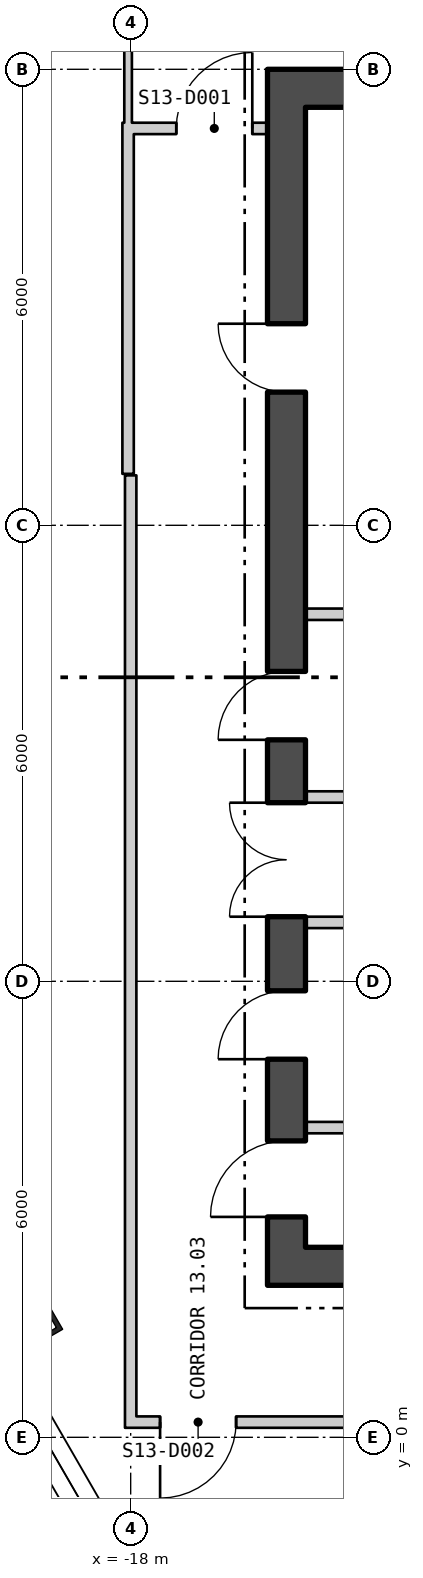
"""IFC4 building model, lengths in metres.
Left out: names, types, materials, properties, quantities, classifications, styles, units other than length and angle.
Written with IfcOpenShell. Run it as: python <this file> out.ifc"""

import sys

from ifc_helpers import new_model, si_unit, direction, frame, frame_2d, origin, origin_2d, place, context, subcontext, project, spatial, polyline, rectangle, hollow_rectangle, outline, extrude, element, fill, save


model = new_model("IFC4")
c1 = context("Model", 3, precision=1e-05, world=origin(), true_north=direction((0.0, 1.0)))
c2 = subcontext(c1, "Body", "Model", "MODEL_VIEW")
j1 = project(units=[si_unit("LENGTHUNIT", "METRE"), si_unit("PLANEANGLEUNIT", "RADIAN")], contexts=[c1])
p1 = place(None, origin())
s1 = spatial("IfcSite", under=j1, at=p1, CompositionType="ELEMENT")
p2 = place(p1, origin())
s2 = spatial("IfcBuilding", under=s1, at=p2, CompositionType="ELEMENT")
p3 = place(p2, frame((0.0, 0.0, 174.9)))
s3 = spatial("IfcBuildingStorey", under=s2, at=p3, CompositionType="ELEMENT", Elevation=174.9)
p4 = place(p3, frame((-19.348, 1.506, 0.0), z_axis=(0.0, 0.0, 1.0), x_axis=(0.5, -0.866025403784, 0.0)))
e1 = element("IfcColumn", 1, at=p4, inside=s3, PredefinedType="COLUMN", context=c2, shape_type="SweptSolid", body=[
    extrude(hollow_rectangle(XDim=0.6, YDim=0.7, WallThickness=0.06, at=origin_2d()), origin(), (0.0, 0.0, 1.0), 3.9),
])
p5 = place(p3, frame((-26.775, 13.22, -0.18), z_axis=(0.0, 0.0, 1.0), x_axis=(0.500000335318, -0.866025210188, 0.0)))
e2 = element("IfcWall", 2, at=p5, inside=s3, PredefinedType="SOLIDWALL", context=c2, shape_type="SweptSolid", body=[
    extrude(outline(polyline([(-0.13, -0.225), (45.88, -0.225), (45.62, 0.225), (0.13, 0.225), (-0.13, -0.225)])), origin(), (0.0, 0.0, 1.0), 3.68),
])
p6 = place(p5, frame((1.425, 0.0, 1.08)))
e3 = element("IfcOpeningElement", 3, at=p6, cuts=e2, PredefinedType="OPENING", context=c2, shape_type="SweptSolid", body=[
    extrude(rectangle(XDim=2.4, YDim=2.0, at=frame_2d((1.2, 1.0))), frame((0.0, 0.235, 0.0), z_axis=(0.0, -1.0, 0.0), x_axis=(1.0, 0.0, 0.0)), (0.0, 0.0, 1.0), 0.47),
])
p7 = place(p5, frame((5.895, 0.0, 1.08)))
e4 = element("IfcOpeningElement", 4, at=p7, cuts=e2, PredefinedType="OPENING", context=c2, shape_type="SweptSolid", body=[
    extrude(rectangle(XDim=2.4, YDim=2.0, at=frame_2d((1.2, 1.0))), frame((0.0, 0.235, 0.0), z_axis=(0.0, -1.0, 0.0), x_axis=(1.0, 0.0, 0.0)), (0.0, 0.0, 1.0), 0.47),
])
p8 = place(p5, frame((10.403, 0.0, 1.08)))
e5 = element("IfcOpeningElement", 5, at=p8, cuts=e2, PredefinedType="OPENING", context=c2, shape_type="SweptSolid", body=[
    extrude(rectangle(XDim=2.4, YDim=2.0, at=frame_2d((1.2, 1.0))), frame((0.0, 0.235, 0.0), z_axis=(0.0, -1.0, 0.0), x_axis=(1.0, 0.0, 0.0)), (0.0, 0.0, 1.0), 0.47),
])
p9 = place(p5, frame((14.912, 0.0, 1.08)))
e6 = element("IfcOpeningElement", 6, at=p9, cuts=e2, PredefinedType="OPENING", context=c2, shape_type="SweptSolid", body=[
    extrude(rectangle(XDim=2.4, YDim=2.0, at=frame_2d((1.2, 1.0))), frame((0.0, 0.235, 0.0), z_axis=(0.0, -1.0, 0.0), x_axis=(1.0, 0.0, 0.0)), (0.0, 0.0, 1.0), 0.47),
])
p10 = place(p5, frame((19.421, 0.0, 1.08)))
e7 = element("IfcOpeningElement", 7, at=p10, cuts=e2, PredefinedType="OPENING", context=c2, shape_type="SweptSolid", body=[
    extrude(rectangle(XDim=2.4, YDim=2.0, at=frame_2d((1.2, 1.0))), frame((0.0, 0.235, 0.0), z_axis=(0.0, -1.0, 0.0), x_axis=(1.0, 0.0, 0.0)), (0.0, 0.0, 1.0), 0.47),
])
p11 = place(p5, frame((23.929, 0.0, 1.08)))
e8 = element("IfcOpeningElement", 8, at=p11, cuts=e2, PredefinedType="OPENING", context=c2, shape_type="SweptSolid", body=[
    extrude(rectangle(XDim=2.4, YDim=2.0, at=frame_2d((1.2, 1.0))), frame((0.0, 0.235, 0.0), z_axis=(0.0, -1.0, 0.0), x_axis=(1.0, 0.0, 0.0)), (0.0, 0.0, 1.0), 0.47),
])
p12 = place(p5, frame((28.438, 0.0, 1.08)))
e9 = element("IfcOpeningElement", 9, at=p12, cuts=e2, PredefinedType="OPENING", context=c2, shape_type="SweptSolid", body=[
    extrude(rectangle(XDim=2.4, YDim=2.0, at=frame_2d((1.2, 1.0))), frame((0.0, 0.235, 0.0), z_axis=(0.0, -1.0, 0.0), x_axis=(1.0, 0.0, 0.0)), (0.0, 0.0, 1.0), 0.47),
])
p13 = place(p5, frame((32.947, 0.0, 1.08)))
e10 = element("IfcOpeningElement", 10, at=p13, cuts=e2, PredefinedType="OPENING", context=c2, shape_type="SweptSolid", body=[
    extrude(rectangle(XDim=2.4, YDim=2.0, at=frame_2d((1.2, 1.0))), frame((0.0, 0.235, 0.0), z_axis=(0.0, -1.0, 0.0), x_axis=(1.0, 0.0, 0.0)), (0.0, 0.0, 1.0), 0.47),
])
p14 = place(p5, frame((37.455, 0.0, 1.08)))
e11 = element("IfcOpeningElement", 11, at=p14, cuts=e2, PredefinedType="OPENING", context=c2, shape_type="SweptSolid", body=[
    extrude(rectangle(XDim=2.4, YDim=2.0, at=frame_2d((1.2, 1.0))), frame((0.0, 0.235, 0.0), z_axis=(0.0, -1.0, 0.0), x_axis=(1.0, 0.0, 0.0)), (0.0, 0.0, 1.0), 0.47),
])
p15 = place(p5, frame((41.925, 0.0, 1.08)))
e12 = element("IfcOpeningElement", 12, at=p15, cuts=e2, PredefinedType="OPENING", context=c2, shape_type="SweptSolid", body=[
    extrude(rectangle(XDim=2.4, YDim=2.0, at=frame_2d((1.2, 1.0))), frame((0.0, 0.235, 0.0), z_axis=(0.0, -1.0, 0.0), x_axis=(1.0, 0.0, 0.0)), (0.0, 0.0, 1.0), 0.47),
])
p16 = place(p3, frame((-16.2, 2.25, 0.0), z_axis=(0.0, 0.0, 1.0), x_axis=(1.0, 0.0, 0.0)))
e13 = element("IfcWall", 13, at=p16, inside=s3, PredefinedType="SHEAR", context=c2, shape_type="SweptSolid", body=[
    extrude(rectangle(XDim=32.4, YDim=0.5, at=frame_2d((16.2, 0.0))), origin(), (0.0, 0.0, 1.0), 3.7),
])
p17 = place(p16, frame((10.7, 0.0, 0.0)))
e14 = element("IfcOpeningElement", 14, at=p17, cuts=e13, PredefinedType="OPENING", context=c2, shape_type="SweptSolid", body=[
    extrude(rectangle(XDim=1.8, YDim=2.4, at=frame_2d((0.9, 1.2))), frame((0.0, 0.26, 0.0), z_axis=(0.0, -1.0, 0.0), x_axis=(1.0, 0.0, 0.0)), (0.0, 0.0, 1.0), 0.52),
])
p18 = place(p16, frame((20.7, 0.0, 0.0)))
e15 = element("IfcOpeningElement", 15, at=p18, cuts=e13, PredefinedType="OPENING", context=c2, shape_type="SweptSolid", body=[
    extrude(rectangle(XDim=1.8, YDim=2.4, at=frame_2d((0.9, 1.2))), frame((0.0, 0.26, 0.0), z_axis=(0.0, -1.0, 0.0), x_axis=(1.0, 0.0, 0.0)), (0.0, 0.0, 1.0), 0.52),
])
p19 = place(p3, frame((-16.2, 17.75, 0.0), z_axis=(0.0, 0.0, 1.0), x_axis=(1.0, 0.0, 0.0)))
e16 = element("IfcWall", 16, at=p19, inside=s3, PredefinedType="SHEAR", context=c2, shape_type="SweptSolid", body=[
    extrude(rectangle(XDim=32.4, YDim=0.5, at=frame_2d((16.2, 0.0))), origin(), (0.0, 0.0, 1.0), 3.7),
])
p20 = place(p3, frame((-15.95, 2.5, 0.0), z_axis=(0.0, 0.0, 1.0), x_axis=(0.0, 1.0, 0.0)))
e17 = element("IfcWall", 17, at=p20, inside=s3, PredefinedType="SHEAR", context=c2, shape_type="SweptSolid", body=[
    extrude(rectangle(XDim=15.0, YDim=0.5, at=frame_2d((7.5, 0.0))), origin(), (0.0, 0.0, 1.0), 3.7),
])
p21 = place(p20, frame((4.35, 0.0, 0.0)))
e18 = element("IfcOpeningElement", 18, at=p21, cuts=e17, PredefinedType="OPENING", context=c2, shape_type="SweptSolid", body=[
    extrude(rectangle(XDim=1.5, YDim=2.1, at=frame_2d((0.75, 1.05))), frame((0.0, 0.26, 0.0), z_axis=(0.0, -1.0, 0.0), x_axis=(1.0, 0.0, 0.0)), (0.0, 0.0, 1.0), 0.52),
])
p22 = place(p20, frame((0.4, 0.0, 0.0)))
e19 = element("IfcOpeningElement", 19, at=p22, cuts=e17, PredefinedType="OPENING", context=c2, shape_type="SweptSolid", body=[
    extrude(rectangle(XDim=1.0, YDim=2.1, at=frame_2d((0.5, 1.05))), frame((0.0, 0.26, 0.0), z_axis=(0.0, -1.0, 0.0), x_axis=(1.0, 0.0, 0.0)), (0.0, 0.0, 1.0), 0.52),
])
p23 = place(p20, frame((2.475, 0.0, 0.0)))
e20 = element("IfcOpeningElement", 20, at=p23, cuts=e17, PredefinedType="OPENING", context=c2, shape_type="SweptSolid", body=[
    extrude(rectangle(XDim=0.9, YDim=2.1, at=frame_2d((0.45, 1.05))), frame((0.0, 0.26, 0.0), z_axis=(0.0, -1.0, 0.0), x_axis=(1.0, 0.0, 0.0)), (0.0, 0.0, 1.0), 0.52),
])
p24 = place(p20, frame((6.677, 0.0, 0.0)))
e21 = element("IfcOpeningElement", 21, at=p24, cuts=e17, PredefinedType="OPENING", context=c2, shape_type="SweptSolid", body=[
    extrude(rectangle(XDim=0.9, YDim=2.1, at=frame_2d((0.45, 1.05))), frame((0.0, 0.26, 0.0), z_axis=(0.0, -1.0, 0.0), x_axis=(1.0, 0.0, 0.0)), (0.0, 0.0, 1.0), 0.52),
])
p25 = place(p20, frame((11.252, 0.0, 0.0)))
e22 = element("IfcOpeningElement", 22, at=p25, cuts=e17, PredefinedType="OPENING", context=c2, shape_type="SweptSolid", body=[
    extrude(rectangle(XDim=0.9, YDim=2.1, at=frame_2d((0.45, 1.05))), frame((0.0, 0.26, 0.0), z_axis=(0.0, -1.0, 0.0), x_axis=(1.0, 0.0, 0.0)), (0.0, 0.0, 1.0), 0.52),
])
for number, where, z_axis, x_axis in (
    (23, (-15.7, 6.775, 0.0), (0.0, 0.0, 1.0), (1.0, 0.0, 0.0)),
    (24, (-15.7, 8.425, 0.0), (0.0, 0.0, 1.0), (1.0, 0.0, 0.0)),
    (25, (-15.7, 4.075, 0.0), (0.0, 0.0, 1.0), (1.0, 0.0, 0.0)),
    (26, (-15.7, 10.829, 0.0), (0.0, 0.0, 1.0), (1.0, 0.0, 0.0)),
):
    element("IfcWall", number, at=place(p3, frame(where, z_axis=z_axis, x_axis=x_axis)), inside=s3, PredefinedType="PARTITIONING", context=c2, shape_type="SweptSolid", body=[
        extrude(rectangle(XDim=1.2, YDim=0.15, at=frame_2d((0.6, 0.0))), origin(), (0.0, 0.0, 1.0), 3.7),
    ])
p26 = place(p3, frame((-18.034, 12.677, 0.0), z_axis=(0.0, 0.0, 1.0), x_axis=(0.0, 1.0, 0.0)))
e27 = element("IfcWall", 27, at=p26, inside=s3, PredefinedType="PARTITIONING", context=c2, shape_type="SweptSolid", body=[
    extrude(rectangle(XDim=4.62, YDim=0.15, at=frame_2d((2.31, 0.0))), origin(), (0.0, 0.0, 1.0), 3.7),
])
p27 = place(p3, frame((-18.034, 17.297, 0.0), z_axis=(0.0, 0.0, 1.0), x_axis=(0.0, 1.0, 0.0)))
e28 = element("IfcWall", 28, at=p27, inside=s3, PredefinedType="PARTITIONING", context=c2, shape_type="SweptSolid", body=[
    extrude(rectangle(XDim=2.003, YDim=0.1, at=frame_2d((1.002, 0.0))), origin(), (0.0, 0.0, 1.0), 3.7),
])
p28 = place(p3, frame((-18.0, 0.125, 0.0), z_axis=(0.0, 0.0, 1.0), x_axis=(0.0, 1.0, 0.0)))
e29 = element("IfcWall", 29, at=p28, inside=s3, PredefinedType="PARTITIONING", context=c2, shape_type="SweptSolid", body=[
    extrude(rectangle(XDim=12.532, YDim=0.15, at=frame_2d((6.266, 0.0))), origin(), (0.0, 0.0, 1.0), 3.7),
])
p29 = place(p3, frame((-17.959, 17.222, 0.0), z_axis=(0.0, 0.0, 1.0), x_axis=(1.0, 0.0, 0.0)))
e30 = element("IfcWall", 30, at=p29, inside=s3, PredefinedType="PARTITIONING", context=c2, shape_type="SweptSolid", body=[
    extrude(rectangle(XDim=1.759, YDim=0.15, at=frame_2d((0.879, 0.0))), origin(), (0.0, 0.0, 1.0), 3.7),
])
p30 = place(p29, frame((0.559, 0.0, 0.0)))
e31 = element("IfcOpeningElement", 31, at=p30, cuts=e30, PredefinedType="OPENING", context=c2, shape_type="SweptSolid", body=[
    extrude(rectangle(XDim=1.0, YDim=2.1, at=frame_2d((0.5, 1.05))), frame((0.0, 0.085, 0.0), z_axis=(0.0, -1.0, 0.0), x_axis=(1.0, 0.0, 0.0)), (0.0, 0.0, 1.0), 0.17),
])
p31 = place(p3, frame((-17.925, 0.2, 0.0), z_axis=(0.0, 0.0, 1.0), x_axis=(1.0, 0.0, 0.0)))
e32 = element("IfcWall", 32, at=p31, inside=s3, PredefinedType="PARTITIONING", context=c2, shape_type="SweptSolid", body=[
    extrude(rectangle(XDim=10.83, YDim=0.15, at=frame_2d((5.415, 0.0))), origin(), (0.0, 0.0, 1.0), 3.7),
])
p32 = place(p31, frame((0.312, 0.0, 0.0)))
e33 = element("IfcOpeningElement", 33, at=p32, cuts=e32, PredefinedType="OPENING", context=c2, shape_type="SweptSolid", body=[
    extrude(rectangle(XDim=1.0, YDim=2.1, at=frame_2d((0.5, 1.05))), frame((0.0, 0.085, 0.0), z_axis=(0.0, -1.0, 0.0), x_axis=(1.0, 0.0, 0.0)), (0.0, 0.0, 1.0), 0.17),
])
p33 = place(p9, origin())
e34 = element("IfcWindow", 34, at=p33, inside=s3, PartitioningType="SINGLE_PANEL", PredefinedType="WINDOW", context=c2, shape_type="SweptSolid", body=[
    extrude(rectangle(XDim=2.4, YDim=2.0, at=frame_2d((1.2, 1.0))), frame((0.0, 0.105, 0.0), z_axis=(0.0, -1.0, 0.0), x_axis=(1.0, 0.0, 0.0)), (0.0, 0.0, 1.0), 0.06),
])
fill(e6, e34)
p34 = place(p21, origin())
e35 = element("IfcDoor", 35, at=p34, inside=s3, OperationType="DOUBLE_DOOR_SINGLE_SWING", PredefinedType="DOOR", context=c2, shape_type="SweptSolid", body=[
    extrude(rectangle(XDim=1.5, YDim=2.1, at=frame_2d((0.75, 1.05))), frame((0.0, 0.025, 0.0), z_axis=(0.0, -1.0, 0.0), x_axis=(1.0, 0.0, 0.0)), (0.0, 0.0, 1.0), 0.05),
])
fill(e18, e35)
p35 = place(p22, origin())
e36 = element("IfcDoor", 36, at=p35, inside=s3, OperationType="SINGLE_SWING_RIGHT", PredefinedType="DOOR", context=c2, shape_type="SweptSolid", body=[
    extrude(rectangle(XDim=1.0, YDim=2.1, at=frame_2d((0.5, 1.05))), frame((0.0, 0.025, 0.0), z_axis=(0.0, -1.0, 0.0), x_axis=(1.0, 0.0, 0.0)), (0.0, 0.0, 1.0), 0.05),
])
fill(e19, e36)
p36 = place(p23, origin())
e37 = element("IfcDoor", 37, at=p36, inside=s3, OperationType="SINGLE_SWING_RIGHT", PredefinedType="DOOR", context=c2, shape_type="SweptSolid", body=[
    extrude(rectangle(XDim=0.9, YDim=2.1, at=frame_2d((0.45, 1.05))), frame((0.0, 0.025, 0.0), z_axis=(0.0, -1.0, 0.0), x_axis=(1.0, 0.0, 0.0)), (0.0, 0.0, 1.0), 0.05),
])
fill(e20, e37)
p37 = place(p24, origin())
e38 = element("IfcDoor", 38, at=p37, inside=s3, OperationType="SINGLE_SWING_RIGHT", PredefinedType="DOOR", context=c2, shape_type="SweptSolid", body=[
    extrude(rectangle(XDim=0.9, YDim=2.1, at=frame_2d((0.45, 1.05))), frame((0.0, 0.025, 0.0), z_axis=(0.0, -1.0, 0.0), x_axis=(1.0, 0.0, 0.0)), (0.0, 0.0, 1.0), 0.05),
])
fill(e21, e38)
p38 = place(p25, origin())
e39 = element("IfcDoor", 39, at=p38, inside=s3, OperationType="SINGLE_SWING_LEFT", PredefinedType="DOOR", context=c2, shape_type="SweptSolid", body=[
    extrude(rectangle(XDim=0.9, YDim=2.1, at=frame_2d((0.45, 1.05))), frame((0.0, 0.025, 0.0), z_axis=(0.0, -1.0, 0.0), x_axis=(1.0, 0.0, 0.0)), (0.0, 0.0, 1.0), 0.05),
])
fill(e22, e39)
p39 = place(p30, origin())
e40 = element("IfcDoor", 40, at=p39, inside=s3, OperationType="SINGLE_SWING_LEFT", PredefinedType="DOOR", context=c2, shape_type="SweptSolid", body=[
    extrude(rectangle(XDim=1.0, YDim=2.1, at=frame_2d((0.5, 1.05))), frame((0.0, 0.025, 0.0), z_axis=(0.0, -1.0, 0.0), x_axis=(1.0, 0.0, 0.0)), (0.0, 0.0, 1.0), 0.05),
])
fill(e31, e40)
p40 = place(p32, origin())
e41 = element("IfcDoor", 41, at=p40, inside=s3, OperationType="SINGLE_SWING_LEFT", PredefinedType="DOOR", context=c2, shape_type="SweptSolid", body=[
    extrude(rectangle(XDim=1.0, YDim=2.1, at=frame_2d((0.5, 1.05))), frame((0.0, 0.025, 0.0), z_axis=(0.0, -1.0, 0.0), x_axis=(1.0, 0.0, 0.0)), (0.0, 0.0, 1.0), 0.05),
])
fill(e33, e41)
save(model, sys.argv[1])
